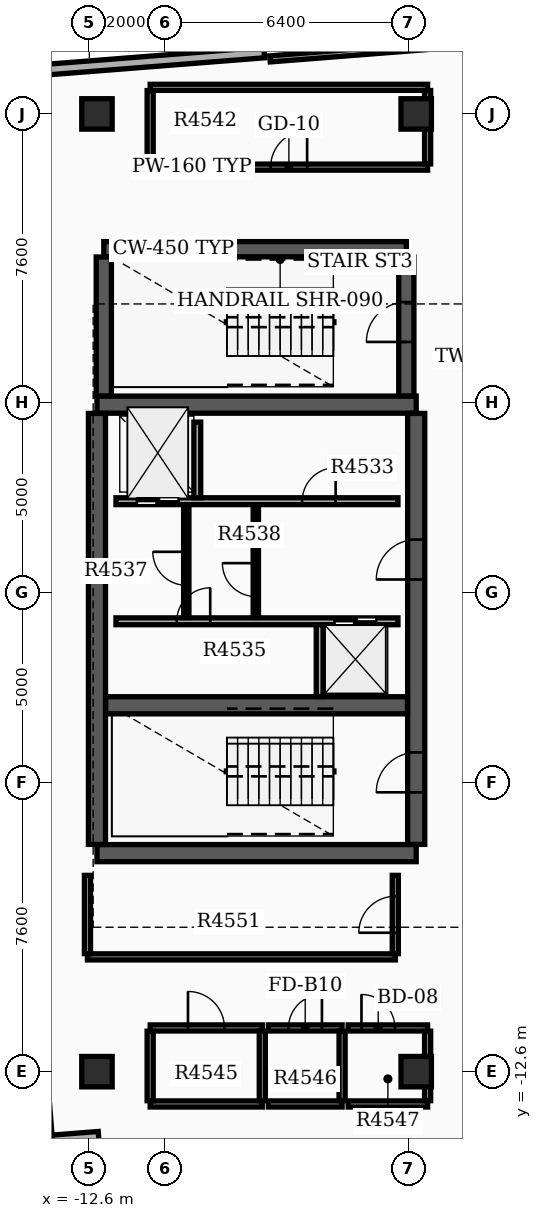
"""IFC4 building model, lengths in metres.
Left out: names, types, materials, properties, quantities, classifications, styles, units other than length and angle.
Written with IfcOpenShell. Run it as: python <this file> out.ifc"""

import sys

from ifc_helpers import new_model, si_unit, direction, frame, frame_2d, origin, origin_2d, place, context, subcontext, project, spatial, rectangle, extrude, element, fill, save


model = new_model("IFC4")
c1 = context("Model", 3, precision=1e-05, world=origin(), true_north=direction((0.0, 1.0)))
c2 = subcontext(c1, "Body", "Model", "MODEL_VIEW")
j1 = project(units=[si_unit("LENGTHUNIT", "METRE"), si_unit("PLANEANGLEUNIT", "RADIAN")], contexts=[c1])
p1 = place(None, origin())
s1 = spatial("IfcSite", under=j1, at=p1, CompositionType="ELEMENT")
p2 = place(p1, origin())
s2 = spatial("IfcBuilding", under=s1, at=p2, CompositionType="ELEMENT")
p3 = place(p2, frame((0.0, 0.0, 285.0)))
s3 = spatial("IfcBuildingStorey", under=s2, at=p3, CompositionType="ELEMENT", Elevation=285.0)
for number, where, z_axis, x_axis in (
    (1, (-12.4, -6.85, 0.0), (0.0, 0.0, 1.0), (1.0, 0.0, 0.0)),
    (2, (-12.4, 4.95, 0.0), (0.0, 0.0, 1.0), (1.0, 0.0, 0.0)),
):
    element("IfcWall", number, at=place(p3, frame(where, z_axis=z_axis, x_axis=x_axis)), inside=s3, PredefinedType="SHEAR", context=c2, shape_type="SweptSolid", body=[
        extrude(rectangle(XDim=8.4, YDim=0.45, at=frame_2d((4.2, 0.0))), origin(), (0.0, 0.0, 1.0), 3.65),
    ])
p4 = place(p3, frame((-12.4, -6.62, 0.0), z_axis=(0.0, 0.0, 1.0), x_axis=(0.0, 1.0, 0.0)))
e3 = element("IfcWall", 3, at=p4, inside=s3, PredefinedType="SHEAR", context=c2, shape_type="SweptSolid", body=[
    extrude(rectangle(XDim=11.34, YDim=0.45, at=frame_2d((5.67, 0.0))), origin(), (0.0, 0.0, 1.0), 3.65),
])
p5 = place(p3, frame((-4.0, -6.62, 0.0), z_axis=(0.0, 0.0, 1.0), x_axis=(0.0, 1.0, 0.0)))
e4 = element("IfcWall", 4, at=p5, inside=s3, PredefinedType="SHEAR", context=c2, shape_type="SweptSolid", body=[
    extrude(rectangle(XDim=11.34, YDim=0.45, at=frame_2d((5.67, 0.0))), origin(), (0.0, 0.0, 1.0), 3.65),
])
p6 = place(p5, frame((1.37, 0.0, 0.0)))
e5 = element("IfcOpeningElement", 5, at=p6, cuts=e4, PredefinedType="OPENING", context=c2, shape_type="SweptSolid", body=[
    extrude(rectangle(XDim=1.05, YDim=2.15, at=frame_2d((0.525, 1.075))), frame((0.0, 0.235, 0.0), z_axis=(0.0, -1.0, 0.0), x_axis=(1.0, 0.0, 0.0)), (0.0, 0.0, 1.0), 0.47),
])
p7 = place(p5, frame((6.97, 0.0, 0.0)))
e6 = element("IfcOpeningElement", 6, at=p7, cuts=e4, PredefinedType="OPENING", context=c2, shape_type="SweptSolid", body=[
    extrude(rectangle(XDim=1.05, YDim=2.15, at=frame_2d((0.525, 1.075))), frame((0.0, 0.235, 0.0), z_axis=(0.0, -1.0, 0.0), x_axis=(1.0, 0.0, 0.0)), (0.0, 0.0, 1.0), 0.47),
])
p8 = place(p3, frame((-12.17, -2.96, 0.0), z_axis=(0.0, 0.0, 1.0), x_axis=(1.0, 0.0, 0.0)))
e7 = element("IfcWall", 7, at=p8, inside=s3, PredefinedType="SHEAR", context=c2, shape_type="SweptSolid", body=[
    extrude(rectangle(XDim=7.94, YDim=0.45, at=frame_2d((3.97, 0.0))), origin(), (0.0, 0.0, 1.0), 3.65),
])
p9 = place(p3, frame((-12.22, 9.04, 0.0), z_axis=(0.0, 0.0, 1.0), x_axis=(1.0, 0.0, 0.0)))
e8 = element("IfcWall", 8, at=p9, inside=s3, PredefinedType="SHEAR", context=c2, shape_type="SweptSolid", body=[
    extrude(rectangle(XDim=7.96, YDim=0.4, at=frame_2d((3.98, 0.0))), origin(), (0.0, 0.0, 1.0), 3.65),
])
p10 = place(p3, frame((-12.22, 5.18, 0.0), z_axis=(0.0, 0.0, 1.0), x_axis=(0.0, 1.0, 0.0)))
e9 = element("IfcWall", 9, at=p10, inside=s3, PredefinedType="SHEAR", context=c2, shape_type="SweptSolid", body=[
    extrude(rectangle(XDim=3.655, YDim=0.4, at=frame_2d((1.828, 0.0))), origin(), (0.0, 0.0, 1.0), 3.65),
])
p11 = place(p3, frame((-4.26, 5.18, 0.0), z_axis=(0.0, 0.0, 1.0), x_axis=(0.0, 1.0, 0.0)))
e10 = element("IfcWall", 10, at=p11, inside=s3, PredefinedType="SHEAR", context=c2, shape_type="SweptSolid", body=[
    extrude(rectangle(XDim=3.655, YDim=0.4, at=frame_2d((1.828, 0.0))), origin(), (0.0, 0.0, 1.0), 3.65),
])
p12 = place(p11, frame((1.42, 0.0, 0.0)))
e11 = element("IfcOpeningElement", 11, at=p12, cuts=e10, PredefinedType="OPENING", context=c2, shape_type="SweptSolid", body=[
    extrude(rectangle(XDim=1.05, YDim=2.15, at=frame_2d((0.525, 1.075))), frame((0.0, 0.21, 0.0), z_axis=(0.0, -1.0, 0.0), x_axis=(1.0, 0.0, 0.0)), (0.0, 0.0, 1.0), 0.42),
])
for number, where, z_axis, x_axis in (
    (12, (-12.4, -12.6, 0.0), (0.0, 0.0, 1.0), (1.0, 0.0, 0.0)),
    (13, (-12.4, 12.6, 0.0), (0.0, 0.0, 1.0), (1.0, 0.0, 0.0)),
    (14, (-4.0, -12.6, 0.0), (0.0, 0.0, 1.0), (1.0, 0.0, 0.0)),
    (15, (-4.0, 12.6, 0.0), (0.0, 0.0, 1.0), (1.0, 0.0, 0.0)),
):
    element("IfcColumn", number, at=place(p3, frame(where, z_axis=z_axis, x_axis=x_axis)), inside=s3, PredefinedType="COLUMN", context=c2, shape_type="SweptSolid", body=[
        extrude(rectangle(XDim=0.8, YDim=0.8, at=origin_2d()), origin(), (0.0, 0.0, 1.0), 3.9),
    ])
p13 = place(p3, frame((-14.281, 13.722, 0.0), z_axis=(0.0, 0.0, 1.0), x_axis=(0.99691915642, 0.078435932851, 0.0)))
e16 = element("IfcWall", 16, at=p13, inside=s3, PredefinedType="STANDARD", context=c2, shape_type="SweptSolid", body=[
    extrude(rectangle(XDim=6.3, YDim=0.28, at=frame_2d((3.15, 0.0))), origin(), (0.0, 0.0, 1.0), 3.13),
])
p14 = place(p3, frame((-14.238, -7.721, 0.0), z_axis=(0.0, 0.0, 1.0), x_axis=(0.078438149236, -0.996918982036, 0.0)))
e17 = element("IfcWall", 17, at=p14, inside=s3, PredefinedType="STANDARD", context=c2, shape_type="SweptSolid", body=[
    extrude(rectangle(XDim=6.86, YDim=0.28, at=frame_2d((3.43, 0.0))), origin(), (0.0, 0.0, 1.0), 3.13),
])
p15 = place(p3, frame((-13.571, -14.409, 0.0), z_axis=(0.0, 0.0, 1.0), x_axis=(0.996918772, 0.078440818672, 0.0)))
e18 = element("IfcWall", 18, at=p15, inside=s3, PredefinedType="STANDARD", context=c2, shape_type="SweptSolid", body=[
    extrude(rectangle(XDim=1.22, YDim=0.28, at=frame_2d((0.61, 0.0))), origin(), (0.0, 0.0, 1.0), 3.13),
])
p16 = place(p3, frame((-11.9, 2.41, 0.0), z_axis=(0.0, 0.0, 1.0), x_axis=(1.0, 0.0, 0.0)))
e19 = element("IfcWall", 19, at=p16, inside=s3, PredefinedType="SOLIDWALL", context=c2, shape_type="SweptSolid", body=[
    extrude(rectangle(XDim=7.42, YDim=0.18, at=frame_2d((3.71, 0.0))), origin(), (0.0, 0.0, 1.0), 3.12),
])
p17 = place(p16, frame((0.55, 0.0, 0.0)))
e20 = element("IfcOpeningElement", 20, at=p17, cuts=e19, PredefinedType="OPENING", context=c2, shape_type="SweptSolid", body=[
    extrude(rectangle(XDim=1.1, YDim=2.15, at=frame_2d((0.55, 1.075))), frame((0.0, 0.1, 0.0), z_axis=(0.0, -1.0, 0.0), x_axis=(1.0, 0.0, 0.0)), (0.0, 0.0, 1.0), 0.2),
])
p18 = place(p16, frame((4.9, 0.0, 0.0)))
e21 = element("IfcOpeningElement", 21, at=p18, cuts=e19, PredefinedType="OPENING", context=c2, shape_type="SweptSolid", body=[
    extrude(rectangle(XDim=0.88, YDim=2.1, at=frame_2d((0.44, 1.05))), frame((0.0, 0.1, 0.0), z_axis=(0.0, -1.0, 0.0), x_axis=(1.0, 0.0, 0.0)), (0.0, 0.0, 1.0), 0.2),
])
p19 = place(p3, frame((-11.9, -0.75, 0.0), z_axis=(0.0, 0.0, 1.0), x_axis=(1.0, 0.0, 0.0)))
e22 = element("IfcWall", 22, at=p19, inside=s3, PredefinedType="SOLIDWALL", context=c2, shape_type="SweptSolid", body=[
    extrude(rectangle(XDim=7.42, YDim=0.18, at=frame_2d((3.71, 0.0))), origin(), (0.0, 0.0, 1.0), 3.12),
])
p20 = place(p19, frame((5.75, 0.0, 0.0)))
e23 = element("IfcOpeningElement", 23, at=p20, cuts=e22, PredefinedType="OPENING", context=c2, shape_type="SweptSolid", body=[
    extrude(rectangle(XDim=1.1, YDim=2.15, at=frame_2d((0.55, 1.075))), frame((0.0, 0.1, 0.0), z_axis=(0.0, -1.0, 0.0), x_axis=(1.0, 0.0, 0.0)), (0.0, 0.0, 1.0), 0.2),
])
p21 = place(p19, frame((1.6, 0.0, 0.0)))
e24 = element("IfcOpeningElement", 24, at=p21, cuts=e22, PredefinedType="OPENING", context=c2, shape_type="SweptSolid", body=[
    extrude(rectangle(XDim=0.88, YDim=2.1, at=frame_2d((0.44, 1.05))), frame((0.0, 0.1, 0.0), z_axis=(0.0, -1.0, 0.0), x_axis=(1.0, 0.0, 0.0)), (0.0, 0.0, 1.0), 0.2),
])
p22 = place(p3, frame((-9.76, 2.5, 0.0), z_axis=(0.0, 0.0, 1.0), x_axis=(0.0, 1.0, 0.0)))
e25 = element("IfcWall", 25, at=p22, inside=s3, PredefinedType="SOLIDWALL", context=c2, shape_type="SweptSolid", body=[
    extrude(rectangle(XDim=1.99, YDim=0.18, at=frame_2d((0.995, 0.0))), origin(), (0.0, 0.0, 1.0), 3.12),
])
p23 = place(p3, frame((-6.54, -2.73, 0.0), z_axis=(0.0, 0.0, 1.0), x_axis=(0.0, 1.0, 0.0)))
e26 = element("IfcWall", 26, at=p23, inside=s3, PredefinedType="SOLIDWALL", context=c2, shape_type="SweptSolid", body=[
    extrude(rectangle(XDim=1.89, YDim=0.18, at=frame_2d((0.945, 0.0))), origin(), (0.0, 0.0, 1.0), 3.12),
])
p24 = place(p3, frame((-8.22, -0.65, 0.0), z_axis=(0.0, 0.0, 1.0), x_axis=(0.0, 1.0, 0.0)))
e27 = element("IfcWall", 27, at=p24, inside=s3, PredefinedType="SOLIDWALL", context=c2, shape_type="SweptSolid", body=[
    extrude(rectangle(XDim=2.96, YDim=0.14, at=frame_2d((1.48, 0.0))), origin(), (0.0, 0.0, 1.0), 3.12),
])
p25 = place(p24, frame((0.55, 0.0, 0.0)))
e28 = element("IfcOpeningElement", 28, at=p25, cuts=e27, PredefinedType="OPENING", context=c2, shape_type="SweptSolid", body=[
    extrude(rectangle(XDim=0.88, YDim=2.1, at=frame_2d((0.44, 1.05))), frame((0.0, 0.08, 0.0), z_axis=(0.0, -1.0, 0.0), x_axis=(1.0, 0.0, 0.0)), (0.0, 0.0, 1.0), 0.16),
])
p26 = place(p3, frame((-10.05, -0.652, 0.0), z_axis=(0.0, 0.0, 1.0), x_axis=(0.0, 1.0, 0.0)))
e29 = element("IfcWall", 29, at=p26, inside=s3, PredefinedType="PARTITIONING", context=c2, shape_type="SweptSolid", body=[
    extrude(rectangle(XDim=2.962, YDim=0.14, at=frame_2d((1.481, 0.0))), origin(), (0.0, 0.0, 1.0), 3.12),
])
p27 = place(p26, frame((0.85, 0.0, 0.0)))
e30 = element("IfcOpeningElement", 30, at=p27, cuts=e29, PredefinedType="OPENING", context=c2, shape_type="SweptSolid", body=[
    extrude(rectangle(XDim=0.88, YDim=2.1, at=frame_2d((0.44, 1.05))), frame((0.0, 0.08, 0.0), z_axis=(0.0, -1.0, 0.0), x_axis=(1.0, 0.0, 0.0)), (0.0, 0.0, 1.0), 0.16),
])
p28 = place(p3, frame((-11.0, 11.2, 0.0), z_axis=(0.0, 0.0, 1.0), x_axis=(1.0, 0.0, 0.0)))
e31 = element("IfcWall", 31, at=p28, inside=s3, PredefinedType="PARTITIONING", context=c2, shape_type="SweptSolid", body=[
    extrude(rectangle(XDim=7.3, YDim=0.16, at=frame_2d((3.65, 0.0))), origin(), (0.0, 0.0, 1.0), 3.12),
])
p29 = place(p28, frame((3.17, 0.0, 0.0)))
e32 = element("IfcOpeningElement", 32, at=p29, cuts=e31, PredefinedType="OPENING", context=c2, shape_type="SweptSolid", body=[
    extrude(rectangle(XDim=0.96, YDim=2.15, at=frame_2d((0.48, 1.075))), frame((0.0, 0.09, 0.0), z_axis=(0.0, -1.0, 0.0), x_axis=(1.0, 0.0, 0.0)), (0.0, 0.0, 1.0), 0.18),
])
p30 = place(p3, frame((-11.0, 13.3, 0.0), z_axis=(0.0, 0.0, 1.0), x_axis=(1.0, 0.0, 0.0)))
e33 = element("IfcWall", 33, at=p30, inside=s3, PredefinedType="PARTITIONING", context=c2, shape_type="SweptSolid", body=[
    extrude(rectangle(XDim=7.3, YDim=0.16, at=frame_2d((3.65, 0.0))), origin(), (0.0, 0.0, 1.0), 3.12),
])
for number, where, z_axis, x_axis in (
    (34, (-11.0, 11.285, 0.0), (0.0, 0.0, 1.0), (0.0, 1.0, 0.0)),
    (35, (-3.7, 11.285, 0.0), (0.0, 0.0, 1.0), (0.0, 1.0, 0.0)),
):
    element("IfcWall", number, at=place(p3, frame(where, z_axis=z_axis, x_axis=x_axis)), inside=s3, PredefinedType="PARTITIONING", context=c2, shape_type="SweptSolid", body=[
        extrude(rectangle(XDim=1.93, YDim=0.16, at=frame_2d((0.965, 0.0))), origin(), (0.0, 0.0, 1.0), 3.12),
    ])
p31 = place(p3, frame((-11.0, -13.45, 0.0), z_axis=(0.0, 0.0, 1.0), x_axis=(1.0, 0.0, 0.0)))
e36 = element("IfcWall", 36, at=p31, inside=s3, PredefinedType="PARTITIONING", context=c2, shape_type="SweptSolid", body=[
    extrude(rectangle(XDim=2.95, YDim=0.16, at=frame_2d((1.475, 0.0))), origin(), (0.0, 0.0, 1.0), 3.12),
])
p32 = place(p3, frame((-11.0, -11.45, 0.0), z_axis=(0.0, 0.0, 1.0), x_axis=(1.0, 0.0, 0.0)))
e37 = element("IfcWall", 37, at=p32, inside=s3, PredefinedType="PARTITIONING", context=c2, shape_type="SweptSolid", body=[
    extrude(rectangle(XDim=2.95, YDim=0.16, at=frame_2d((1.475, 0.0))), origin(), (0.0, 0.0, 1.0), 3.12),
])
p33 = place(p32, frame((0.995, 0.0, 0.0)))
e38 = element("IfcOpeningElement", 38, at=p33, cuts=e37, PredefinedType="OPENING", context=c2, shape_type="SweptSolid", body=[
    extrude(rectangle(XDim=0.96, YDim=2.15, at=frame_2d((0.48, 1.075))), frame((0.0, 0.09, 0.0), z_axis=(0.0, -1.0, 0.0), x_axis=(1.0, 0.0, 0.0)), (0.0, 0.0, 1.0), 0.18),
])
for number, where, z_axis, x_axis in (
    (39, (-11.0, -13.365, 0.0), (0.0, 0.0, 1.0), (0.0, 1.0, 0.0)),
    (40, (-8.05, -13.365, 0.0), (0.0, 0.0, 1.0), (0.0, 1.0, 0.0)),
):
    element("IfcWall", number, at=place(p3, frame(where, z_axis=z_axis, x_axis=x_axis)), inside=s3, PredefinedType="PARTITIONING", context=c2, shape_type="SweptSolid", body=[
        extrude(rectangle(XDim=1.83, YDim=0.16, at=frame_2d((0.915, 0.0))), origin(), (0.0, 0.0, 1.0), 3.12),
    ])
p34 = place(p3, frame((-7.89, -13.45, 0.0), z_axis=(0.0, 0.0, 1.0), x_axis=(1.0, 0.0, 0.0)))
e41 = element("IfcWall", 41, at=p34, inside=s3, PredefinedType="PARTITIONING", context=c2, shape_type="SweptSolid", body=[
    extrude(rectangle(XDim=1.94, YDim=0.16, at=frame_2d((0.97, 0.0))), origin(), (0.0, 0.0, 1.0), 3.12),
])
p35 = place(p3, frame((-7.89, -11.45, 0.0), z_axis=(0.0, 0.0, 1.0), x_axis=(1.0, 0.0, 0.0)))
e42 = element("IfcWall", 42, at=p35, inside=s3, PredefinedType="PARTITIONING", context=c2, shape_type="SweptSolid", body=[
    extrude(rectangle(XDim=1.94, YDim=0.16, at=frame_2d((0.97, 0.0))), origin(), (0.0, 0.0, 1.0), 3.12),
])
p36 = place(p35, frame((0.53, 0.0, 0.0)))
e43 = element("IfcOpeningElement", 43, at=p36, cuts=e42, PredefinedType="OPENING", context=c2, shape_type="SweptSolid", body=[
    extrude(rectangle(XDim=0.88, YDim=2.1, at=frame_2d((0.44, 1.05))), frame((0.0, 0.09, 0.0), z_axis=(0.0, -1.0, 0.0), x_axis=(1.0, 0.0, 0.0)), (0.0, 0.0, 1.0), 0.18),
])
p37 = place(p3, frame((-5.95, -13.365, 0.0), z_axis=(0.0, 0.0, 1.0), x_axis=(0.0, 1.0, 0.0)))
e44 = element("IfcWall", 44, at=p37, inside=s3, PredefinedType="PARTITIONING", context=c2, shape_type="SweptSolid", body=[
    extrude(rectangle(XDim=1.83, YDim=0.16, at=frame_2d((0.915, 0.0))), origin(), (0.0, 0.0, 1.0), 3.12),
])
p38 = place(p3, frame((-5.79, -13.45, 0.0), z_axis=(0.0, 0.0, 1.0), x_axis=(1.0, 0.0, 0.0)))
e45 = element("IfcWall", 45, at=p38, inside=s3, PredefinedType="PARTITIONING", context=c2, shape_type="SweptSolid", body=[
    extrude(rectangle(XDim=2.09, YDim=0.16, at=frame_2d((1.045, 0.0))), origin(), (0.0, 0.0, 1.0), 3.12),
])
p39 = place(p3, frame((-5.79, -11.45, 0.0), z_axis=(0.0, 0.0, 1.0), x_axis=(1.0, 0.0, 0.0)))
e46 = element("IfcWall", 46, at=p39, inside=s3, PredefinedType="PARTITIONING", context=c2, shape_type="SweptSolid", body=[
    extrude(rectangle(XDim=2.09, YDim=0.16, at=frame_2d((1.045, 0.0))), origin(), (0.0, 0.0, 1.0), 3.12),
])
p40 = place(p39, frame((0.35, 0.0, 0.0)))
e47 = element("IfcOpeningElement", 47, at=p40, cuts=e46, PredefinedType="OPENING", context=c2, shape_type="SweptSolid", body=[
    extrude(rectangle(XDim=0.88, YDim=2.15, at=frame_2d((0.44, 1.075))), frame((0.0, 0.09, 0.0), z_axis=(0.0, -1.0, 0.0), x_axis=(1.0, 0.0, 0.0)), (0.0, 0.0, 1.0), 0.18),
])
p41 = place(p3, frame((-3.7, -13.365, 0.0), z_axis=(0.0, 0.0, 1.0), x_axis=(0.0, 1.0, 0.0)))
e48 = element("IfcWall", 48, at=p41, inside=s3, PredefinedType="PARTITIONING", context=c2, shape_type="SweptSolid", body=[
    extrude(rectangle(XDim=1.83, YDim=0.16, at=frame_2d((0.915, 0.0))), origin(), (0.0, 0.0, 1.0), 3.12),
])
p42 = place(p3, frame((-12.65, -9.58, 0.0), z_axis=(0.0, 0.0, 1.0), x_axis=(1.0, 0.0, 0.0)))
e49 = element("IfcWall", 49, at=p42, inside=s3, PredefinedType="PARTITIONING", context=c2, shape_type="SweptSolid", body=[
    extrude(rectangle(XDim=8.1, YDim=0.16, at=frame_2d((4.05, 0.0))), origin(), (0.0, 0.0, 1.0), 3.12),
])
p43 = place(p3, frame((-12.65, -9.495, 0.0), z_axis=(0.0, 0.0, 1.0), x_axis=(0.0, 1.0, 0.0)))
e50 = element("IfcWall", 50, at=p43, inside=s3, PredefinedType="PARTITIONING", context=c2, shape_type="SweptSolid", body=[
    extrude(rectangle(XDim=2.06, YDim=0.16, at=frame_2d((1.03, 0.0))), origin(), (0.0, 0.0, 1.0), 3.12),
])
p44 = place(p3, frame((-4.55, -9.495, 0.0), z_axis=(0.0, 0.0, 1.0), x_axis=(0.0, 1.0, 0.0)))
e51 = element("IfcWall", 51, at=p44, inside=s3, PredefinedType="PARTITIONING", context=c2, shape_type="SweptSolid", body=[
    extrude(rectangle(XDim=2.06, YDim=0.16, at=frame_2d((1.03, 0.0))), origin(), (0.0, 0.0, 1.0), 3.12),
])
p45 = place(p44, frame((0.55, 0.0, 0.0)))
e52 = element("IfcOpeningElement", 52, at=p45, cuts=e51, PredefinedType="OPENING", context=c2, shape_type="SweptSolid", body=[
    extrude(rectangle(XDim=0.96, YDim=2.15, at=frame_2d((0.48, 1.075))), frame((0.0, 0.09, 0.0), z_axis=(0.0, -1.0, 0.0), x_axis=(1.0, 0.0, 0.0)), (0.0, 0.0, 1.0), 0.18),
])
p46 = place(p3, frame((-2.423, 14.475, 0.0), z_axis=(0.0, 0.0, 1.0), x_axis=(-0.996914804862, -0.078491221469, 0.0)))
e53 = element("IfcWall", 53, at=p46, inside=s3, PredefinedType="PARTITIONING", context=c2, shape_type="SweptSolid", body=[
    extrude(rectangle(XDim=5.44, YDim=0.16, at=frame_2d((2.72, 0.0))), origin(), (0.0, 0.0, 1.0), 3.12),
])
p47 = place(p6, origin())
e54 = element("IfcDoor", 54, at=p47, inside=s3, OperationType="SINGLE_SWING_LEFT", PredefinedType="DOOR", context=c2, shape_type="SweptSolid", body=[
    extrude(rectangle(XDim=1.05, YDim=2.15, at=frame_2d((0.525, 1.075))), frame((0.0, 0.025, 0.0), z_axis=(0.0, -1.0, 0.0), x_axis=(1.0, 0.0, 0.0)), (0.0, 0.0, 1.0), 0.05),
])
fill(e5, e54)
p48 = place(p7, origin())
e55 = element("IfcDoor", 55, at=p48, inside=s3, OperationType="SINGLE_SWING_LEFT", PredefinedType="DOOR", context=c2, shape_type="SweptSolid", body=[
    extrude(rectangle(XDim=1.05, YDim=2.15, at=frame_2d((0.525, 1.075))), frame((0.0, 0.025, 0.0), z_axis=(0.0, -1.0, 0.0), x_axis=(1.0, 0.0, 0.0)), (0.0, 0.0, 1.0), 0.05),
])
fill(e6, e55)
p49 = place(p12, origin())
e56 = element("IfcDoor", 56, at=p49, inside=s3, OperationType="SINGLE_SWING_LEFT", PredefinedType="DOOR", context=c2, shape_type="SweptSolid", body=[
    extrude(rectangle(XDim=1.05, YDim=2.15, at=frame_2d((0.525, 1.075))), frame((0.0, 0.025, 0.0), z_axis=(0.0, -1.0, 0.0), x_axis=(1.0, 0.0, 0.0)), (0.0, 0.0, 1.0), 0.05),
])
fill(e11, e56)
p50 = place(p17, origin())
e57 = element("IfcDoor", 57, at=p50, inside=s3, OperationType="DOUBLE_DOOR_SLIDING", PredefinedType="DOOR", context=c2, shape_type="SweptSolid", body=[
    extrude(rectangle(XDim=1.1, YDim=2.15, at=frame_2d((0.55, 1.075))), frame((0.0, 0.025, 0.0), z_axis=(0.0, -1.0, 0.0), x_axis=(1.0, 0.0, 0.0)), (0.0, 0.0, 1.0), 0.05),
])
fill(e20, e57)
p51 = place(p20, origin())
e58 = element("IfcDoor", 58, at=p51, inside=s3, OperationType="DOUBLE_DOOR_SLIDING", PredefinedType="DOOR", context=c2, shape_type="SweptSolid", body=[
    extrude(rectangle(XDim=1.1, YDim=2.15, at=frame_2d((0.55, 1.075))), frame((0.0, 0.025, 0.0), z_axis=(0.0, -1.0, 0.0), x_axis=(1.0, 0.0, 0.0)), (0.0, 0.0, 1.0), 0.05),
])
fill(e23, e58)
p52 = place(p18, origin())
e59 = element("IfcDoor", 59, at=p52, inside=s3, OperationType="SINGLE_SWING_RIGHT", PredefinedType="DOOR", context=c2, shape_type="SweptSolid", body=[
    extrude(rectangle(XDim=0.88, YDim=2.1, at=frame_2d((0.44, 1.05))), frame((0.0, 0.025, 0.0), z_axis=(0.0, -1.0, 0.0), x_axis=(1.0, 0.0, 0.0)), (0.0, 0.0, 1.0), 0.05),
])
fill(e21, e59)
p53 = place(p21, origin())
e60 = element("IfcDoor", 60, at=p53, inside=s3, OperationType="SINGLE_SWING_RIGHT", PredefinedType="DOOR", context=c2, shape_type="SweptSolid", body=[
    extrude(rectangle(XDim=0.88, YDim=2.1, at=frame_2d((0.44, 1.05))), frame((0.0, 0.025, 0.0), z_axis=(0.0, -1.0, 0.0), x_axis=(1.0, 0.0, 0.0)), (0.0, 0.0, 1.0), 0.05),
])
fill(e24, e60)
p54 = place(p25, origin())
e61 = element("IfcDoor", 61, at=p54, inside=s3, OperationType="SINGLE_SWING_RIGHT", PredefinedType="DOOR", context=c2, shape_type="SweptSolid", body=[
    extrude(rectangle(XDim=0.88, YDim=2.1, at=frame_2d((0.44, 1.05))), frame((0.0, 0.025, 0.0), z_axis=(0.0, -1.0, 0.0), x_axis=(1.0, 0.0, 0.0)), (0.0, 0.0, 1.0), 0.05),
])
fill(e28, e61)
p55 = place(p27, origin())
e62 = element("IfcDoor", 62, at=p55, inside=s3, OperationType="SINGLE_SWING_RIGHT", PredefinedType="DOOR", context=c2, shape_type="SweptSolid", body=[
    extrude(rectangle(XDim=0.88, YDim=2.1, at=frame_2d((0.44, 1.05))), frame((0.0, 0.025, 0.0), z_axis=(0.0, -1.0, 0.0), x_axis=(1.0, 0.0, 0.0)), (0.0, 0.0, 1.0), 0.05),
])
fill(e30, e62)
p56 = place(p29, origin())
e63 = element("IfcDoor", 63, at=p56, inside=s3, OperationType="SINGLE_SWING_RIGHT", PredefinedType="DOOR", context=c2, shape_type="SweptSolid", body=[
    extrude(rectangle(XDim=0.96, YDim=2.15, at=frame_2d((0.48, 1.075))), frame((0.0, 0.025, 0.0), z_axis=(0.0, -1.0, 0.0), x_axis=(1.0, 0.0, 0.0)), (0.0, 0.0, 1.0), 0.05),
])
fill(e32, e63)
p57 = place(p33, origin())
e64 = element("IfcDoor", 64, at=p57, inside=s3, OperationType="SINGLE_SWING_LEFT", PredefinedType="DOOR", context=c2, shape_type="SweptSolid", body=[
    extrude(rectangle(XDim=0.96, YDim=2.15, at=frame_2d((0.48, 1.075))), frame((0.0, 0.025, 0.0), z_axis=(0.0, -1.0, 0.0), x_axis=(1.0, 0.0, 0.0)), (0.0, 0.0, 1.0), 0.05),
])
fill(e38, e64)
p58 = place(p36, origin())
e65 = element("IfcDoor", 65, at=p58, inside=s3, OperationType="SINGLE_SWING_RIGHT", PredefinedType="DOOR", context=c2, shape_type="SweptSolid", body=[
    extrude(rectangle(XDim=0.88, YDim=2.1, at=frame_2d((0.44, 1.05))), frame((0.0, 0.025, 0.0), z_axis=(0.0, -1.0, 0.0), x_axis=(1.0, 0.0, 0.0)), (0.0, 0.0, 1.0), 0.05),
])
fill(e43, e65)
p59 = place(p40, origin())
e66 = element("IfcDoor", 66, at=p59, inside=s3, OperationType="SINGLE_SWING_LEFT", PredefinedType="DOOR", context=c2, shape_type="SweptSolid", body=[
    extrude(rectangle(XDim=0.88, YDim=2.15, at=frame_2d((0.44, 1.075))), frame((0.0, 0.025, 0.0), z_axis=(0.0, -1.0, 0.0), x_axis=(1.0, 0.0, 0.0)), (0.0, 0.0, 1.0), 0.05),
])
fill(e47, e66)
p60 = place(p45, origin())
e67 = element("IfcDoor", 67, at=p60, inside=s3, OperationType="SINGLE_SWING_LEFT", PredefinedType="DOOR", context=c2, shape_type="SweptSolid", body=[
    extrude(rectangle(XDim=0.96, YDim=2.15, at=frame_2d((0.48, 1.075))), frame((0.0, 0.025, 0.0), z_axis=(0.0, -1.0, 0.0), x_axis=(1.0, 0.0, 0.0)), (0.0, 0.0, 1.0), 0.05),
])
fill(e52, e67)
save(model, sys.argv[1])
